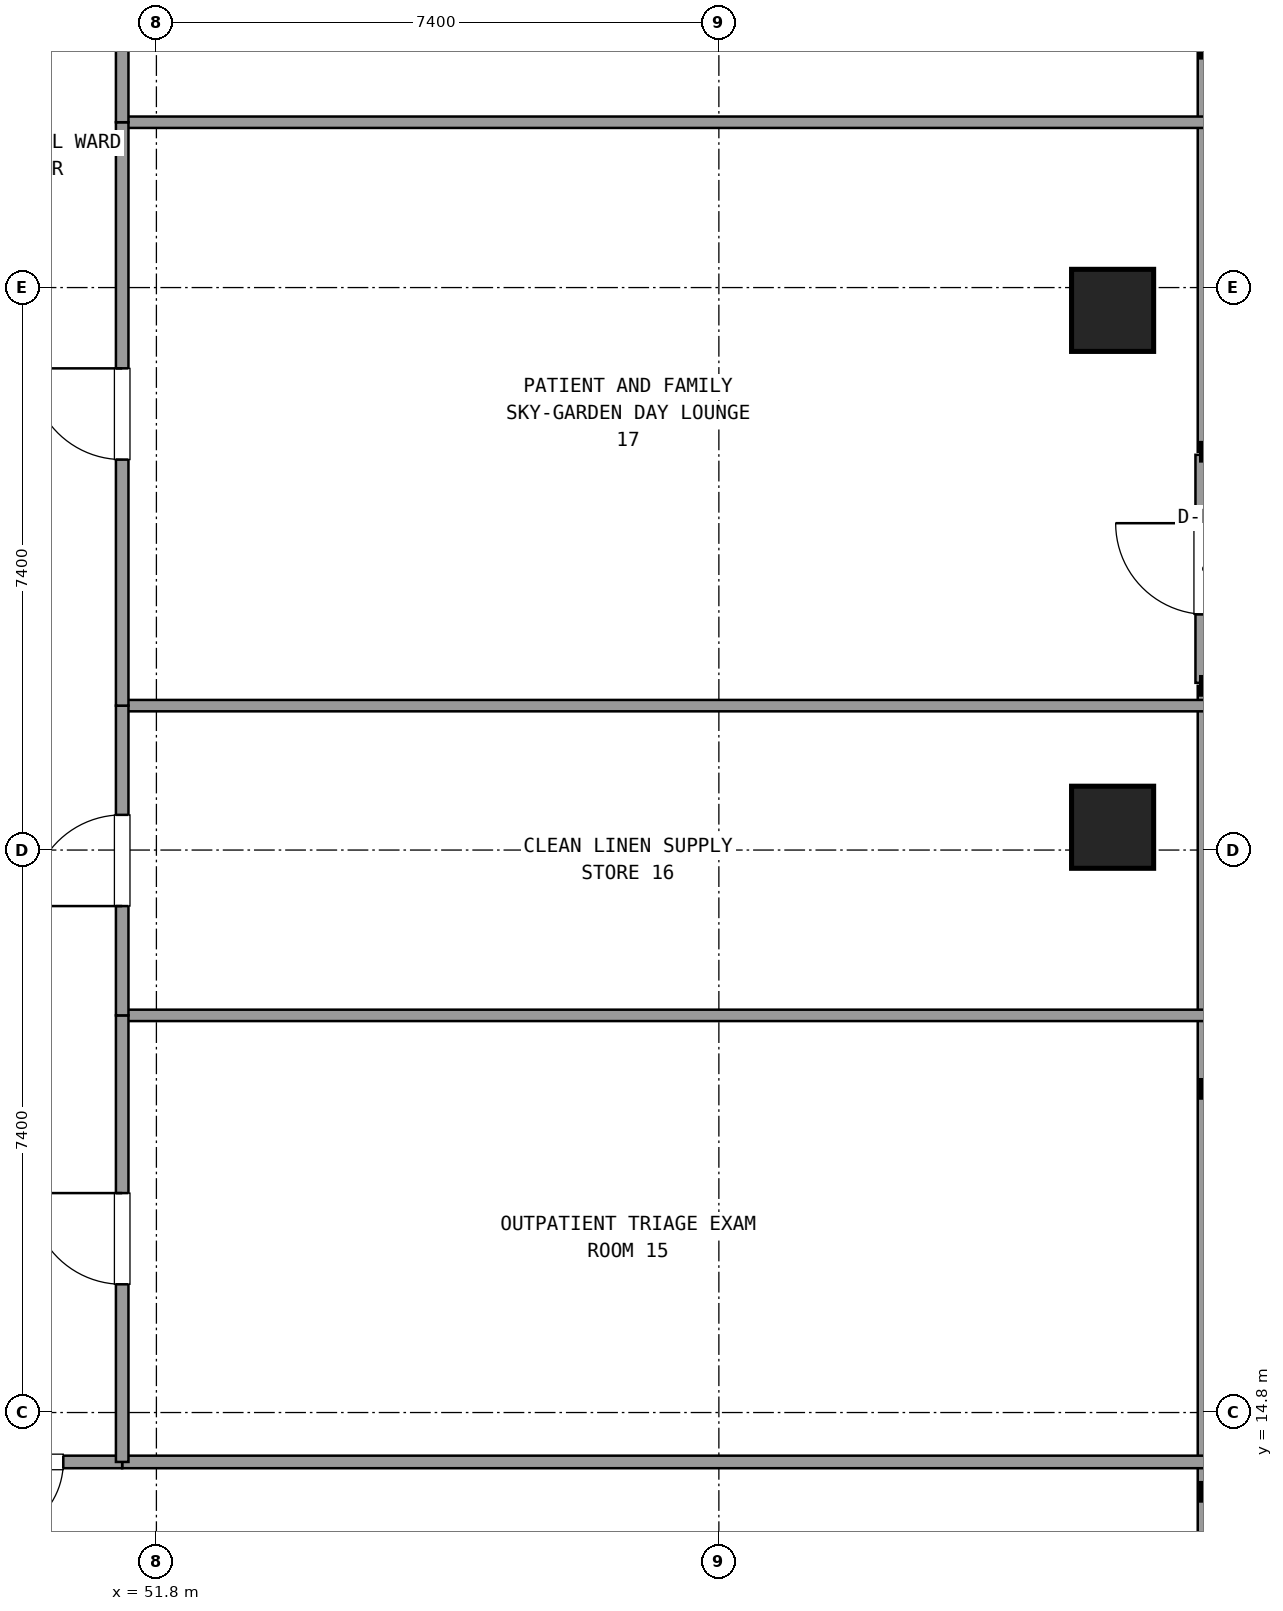
"""IFC4 building model, lengths in metres.
Left out: names, types, materials, properties, quantities, classifications, styles, units other than length and angle.
Written with IfcOpenShell. Run it as: python <this file> out.ifc"""

import sys

from ifc_helpers import new_model, si_unit, direction, frame, frame_2d, origin, origin_2d, place, context, subcontext, project, spatial, rectangle, extrude, element, fill, save


model = new_model("IFC4")
c1 = context("Model", 3, precision=1e-05, world=origin(), true_north=direction((0.0, 1.0)))
c2 = subcontext(c1, "Body", "Model", "MODEL_VIEW")
j1 = project(units=[si_unit("LENGTHUNIT", "METRE"), si_unit("PLANEANGLEUNIT", "RADIAN")], contexts=[c1])
p1 = place(None, origin())
s1 = spatial("IfcSite", under=j1, at=p1, CompositionType="ELEMENT")
p2 = place(p1, origin())
s2 = spatial("IfcBuilding", under=s1, at=p2, CompositionType="ELEMENT")
p3 = place(p2, frame((0.0, 0.0, 45.54)))
s3 = spatial("IfcBuildingStorey", under=s2, at=p3, CompositionType="ELEMENT", Elevation=45.54)
for number, where, z_axis, x_axis in (
    (1, (64.38, 22.5, 0.0), (0.0, 0.0, 1.0), (1.0, 0.0, 0.0)),
    (2, (64.38, 29.3, 0.0), (0.0, 0.0, 1.0), (1.0, 0.0, 0.0)),
):
    element("IfcColumn", number, at=place(p3, frame(where, z_axis=z_axis, x_axis=x_axis)), inside=s3, PredefinedType="COLUMN", context=c2, shape_type="SweptSolid", body=[
        extrude(rectangle(XDim=1.08, YDim=1.08, at=origin_2d()), origin(), (0.0, 0.0, 1.0), 3.6),
    ])
p4 = place(p3, frame((65.62, 24.4, 0.0), z_axis=(0.0, 0.0, 1.0), x_axis=(0.0, 1.0, 0.0)))
e3 = element("IfcWall", 3, at=p4, inside=s3, PredefinedType="SOLIDWALL", context=c2, shape_type="SweptSolid", body=[
    extrude(rectangle(XDim=3.0, YDim=0.3, at=frame_2d((1.5, 0.0))), origin(), (0.0, 0.0, 1.0), 2.65),
])
p5 = place(p4, frame((0.9, 0.0, 0.0)))
e4 = element("IfcOpeningElement", 4, at=p5, cuts=e3, PredefinedType="OPENING", context=c2, shape_type="SweptSolid", body=[
    extrude(rectangle(XDim=1.2, YDim=2.2, at=frame_2d((0.6, 1.1))), frame((0.0, 0.16, 0.0), z_axis=(0.0, -1.0, 0.0), x_axis=(1.0, 0.0, 0.0)), (0.0, 0.0, 1.0), 0.32),
])
for number, where, z_axis, x_axis in (
    (5, (65.62, 8.455, 0.0), (0.0, 0.0, 1.0), (0.0, 1.0, 0.0)),
    (6, (65.62, 27.44, 0.0), (0.0, 0.0, 1.0), (0.0, 1.0, 0.0)),
):
    element("IfcWall", number, at=place(p3, frame(where, z_axis=z_axis, x_axis=x_axis)), inside=s3, PredefinedType="SOLIDWALL", context=c2, shape_type="SweptSolid", body=[
        extrude(rectangle(XDim=15.905, YDim=0.24, at=frame_2d((7.953, 0.0))), origin(), (0.0, 0.0, 1.0), 0.85),
    ])
p6 = place(p3, frame((51.35, 14.15, 0.0), z_axis=(0.0, 0.0, 1.0), x_axis=(1.0, 0.0, 0.0)))
e7 = element("IfcWall", 7, at=p6, inside=s3, PredefinedType="PARTITIONING", context=c2, shape_type="SweptSolid", body=[
    extrude(rectangle(XDim=14.25, YDim=0.165, at=frame_2d((7.125, 0.0))), origin(), (0.0, 0.0, 1.0), 2.61),
])
p7 = place(p3, frame((48.8, 14.15, 0.0), z_axis=(0.0, 0.0, 1.0), x_axis=(1.0, 0.0, 0.0)))
e8 = element("IfcWall", 8, at=p7, inside=s3, PredefinedType="PARTITIONING", context=c2, shape_type="SweptSolid", body=[
    extrude(rectangle(XDim=2.55, YDim=0.165, at=frame_2d((1.275, 0.0))), origin(), (0.0, 0.0, 1.0), 2.61),
])
p8 = place(p7, frame((0.775, 0.0, 0.0)))
e9 = element("IfcOpeningElement", 9, at=p8, cuts=e8, PredefinedType="OPENING", context=c2, shape_type="SweptSolid", body=[
    extrude(rectangle(XDim=1.0, YDim=2.15, at=frame_2d((0.5, 1.075))), frame((0.0, 0.093, 0.0), z_axis=(0.0, -1.0, 0.0), x_axis=(1.0, 0.0, 0.0)), (0.0, 0.0, 1.0), 0.185),
])
p9 = place(p3, frame((51.35, 20.025, 0.0), z_axis=(0.0, 0.0, 1.0), x_axis=(1.0, 0.0, 0.0)))
e10 = element("IfcWall", 10, at=p9, inside=s3, PredefinedType="PARTITIONING", context=c2, shape_type="SweptSolid", body=[
    extrude(rectangle(XDim=14.25, YDim=0.15, at=frame_2d((7.125, 0.0))), origin(), (0.0, 0.0, 1.0), 2.61),
])
p10 = place(p3, frame((51.35, 14.15, 0.0), z_axis=(0.0, 0.0, 1.0), x_axis=(0.0, 1.0, 0.0)))
e11 = element("IfcWall", 11, at=p10, inside=s3, PredefinedType="PARTITIONING", context=c2, shape_type="SweptSolid", body=[
    extrude(rectangle(XDim=5.875, YDim=0.165, at=frame_2d((2.938, 0.0))), origin(), (0.0, 0.0, 1.0), 2.61),
])
p11 = place(p10, frame((2.337, 0.0, 0.0)))
e12 = element("IfcOpeningElement", 12, at=p11, cuts=e11, PredefinedType="OPENING", context=c2, shape_type="SweptSolid", body=[
    extrude(rectangle(XDim=1.2, YDim=2.15, at=frame_2d((0.6, 1.075))), frame((0.0, 0.093, 0.0), z_axis=(0.0, -1.0, 0.0), x_axis=(1.0, 0.0, 0.0)), (0.0, 0.0, 1.0), 0.185),
])
p12 = place(p3, frame((51.35, 24.1, 0.0), z_axis=(0.0, 0.0, 1.0), x_axis=(1.0, 0.0, 0.0)))
e13 = element("IfcWall", 13, at=p12, inside=s3, PredefinedType="PARTITIONING", context=c2, shape_type="SweptSolid", body=[
    extrude(rectangle(XDim=14.25, YDim=0.15, at=frame_2d((7.125, 0.0))), origin(), (0.0, 0.0, 1.0), 2.61),
])
p13 = place(p3, frame((51.35, 20.025, 0.0), z_axis=(0.0, 0.0, 1.0), x_axis=(0.0, 1.0, 0.0)))
e14 = element("IfcWall", 14, at=p13, inside=s3, PredefinedType="PARTITIONING", context=c2, shape_type="SweptSolid", body=[
    extrude(rectangle(XDim=4.075, YDim=0.165, at=frame_2d((2.038, 0.0))), origin(), (0.0, 0.0, 1.0), 2.61),
])
p14 = place(p13, frame((1.438, 0.0, 0.0)))
e15 = element("IfcOpeningElement", 15, at=p14, cuts=e14, PredefinedType="OPENING", context=c2, shape_type="SweptSolid", body=[
    extrude(rectangle(XDim=1.2, YDim=2.15, at=frame_2d((0.6, 1.075))), frame((0.0, 0.093, 0.0), z_axis=(0.0, -1.0, 0.0), x_axis=(1.0, 0.0, 0.0)), (0.0, 0.0, 1.0), 0.185),
])
p15 = place(p3, frame((51.35, 31.775, 0.0), z_axis=(0.0, 0.0, 1.0), x_axis=(1.0, 0.0, 0.0)))
e16 = element("IfcWall", 16, at=p15, inside=s3, PredefinedType="PARTITIONING", context=c2, shape_type="SweptSolid", body=[
    extrude(rectangle(XDim=14.25, YDim=0.15, at=frame_2d((7.125, 0.0))), origin(), (0.0, 0.0, 1.0), 2.61),
])
p16 = place(p3, frame((51.35, 24.1, 0.0), z_axis=(0.0, 0.0, 1.0), x_axis=(0.0, 1.0, 0.0)))
e17 = element("IfcWall", 17, at=p16, inside=s3, PredefinedType="PARTITIONING", context=c2, shape_type="SweptSolid", body=[
    extrude(rectangle(XDim=7.675, YDim=0.165, at=frame_2d((3.837, 0.0))), origin(), (0.0, 0.0, 1.0), 2.61),
])
p17 = place(p16, frame((3.237, 0.0, 0.0)))
e18 = element("IfcOpeningElement", 18, at=p17, cuts=e17, PredefinedType="OPENING", context=c2, shape_type="SweptSolid", body=[
    extrude(rectangle(XDim=1.2, YDim=2.15, at=frame_2d((0.6, 1.075))), frame((0.0, 0.093, 0.0), z_axis=(0.0, -1.0, 0.0), x_axis=(1.0, 0.0, 0.0)), (0.0, 0.0, 1.0), 0.185),
])
p18 = place(p3, frame((51.35, 31.775, 0.0), z_axis=(0.0, 0.0, 1.0), x_axis=(0.0, 1.0, 0.0)))
e19 = element("IfcWall", 19, at=p18, inside=s3, PredefinedType="PARTITIONING", context=c2, shape_type="SweptSolid", body=[
    extrude(rectangle(XDim=5.875, YDim=0.165, at=frame_2d((2.938, 0.0))), origin(), (0.0, 0.0, 1.0), 2.61),
])
p19 = place(p18, frame((2.337, 0.0, 0.0)))
e20 = element("IfcOpeningElement", 20, at=p19, cuts=e19, PredefinedType="OPENING", context=c2, shape_type="SweptSolid", body=[
    extrude(rectangle(XDim=1.2, YDim=2.15, at=frame_2d((0.6, 1.075))), frame((0.0, 0.093, 0.0), z_axis=(0.0, -1.0, 0.0), x_axis=(1.0, 0.0, 0.0)), (0.0, 0.0, 1.0), 0.185),
])
p20 = place(p8, frame((1.0, 0.0, 0.0), z_axis=(0.0, 0.0, 1.0), x_axis=(-1.0, 0.0, 0.0)))
e21 = element("IfcDoor", 21, at=p20, inside=s3, OperationType="SINGLE_SWING_LEFT", PredefinedType="DOOR", context=c2, shape_type="SweptSolid", body=[
    extrude(rectangle(XDim=1.0, YDim=2.15, at=frame_2d((0.5, 1.075))), frame((0.0, 0.025, 0.0), z_axis=(0.0, -1.0, 0.0), x_axis=(1.0, 0.0, 0.0)), (0.0, 0.0, 1.0), 0.05),
])
fill(e9, e21)
p21 = place(p11, origin())
e22 = element("IfcDoor", 22, at=p21, inside=s3, OperationType="SINGLE_SWING_RIGHT", PredefinedType="DOOR", context=c2, shape_type="SweptSolid", body=[
    extrude(rectangle(XDim=1.2, YDim=2.15, at=frame_2d((0.6, 1.075))), frame((0.0, 0.025, 0.0), z_axis=(0.0, -1.0, 0.0), x_axis=(1.0, 0.0, 0.0)), (0.0, 0.0, 1.0), 0.05),
])
fill(e12, e22)
p22 = place(p14, origin())
e23 = element("IfcDoor", 23, at=p22, inside=s3, OperationType="SINGLE_SWING_LEFT", PredefinedType="DOOR", context=c2, shape_type="SweptSolid", body=[
    extrude(rectangle(XDim=1.2, YDim=2.15, at=frame_2d((0.6, 1.075))), frame((0.0, 0.025, 0.0), z_axis=(0.0, -1.0, 0.0), x_axis=(1.0, 0.0, 0.0)), (0.0, 0.0, 1.0), 0.05),
])
fill(e15, e23)
p23 = place(p17, origin())
e24 = element("IfcDoor", 24, at=p23, inside=s3, OperationType="SINGLE_SWING_RIGHT", PredefinedType="DOOR", context=c2, shape_type="SweptSolid", body=[
    extrude(rectangle(XDim=1.2, YDim=2.15, at=frame_2d((0.6, 1.075))), frame((0.0, 0.025, 0.0), z_axis=(0.0, -1.0, 0.0), x_axis=(1.0, 0.0, 0.0)), (0.0, 0.0, 1.0), 0.05),
])
fill(e18, e24)
save(model, sys.argv[1])
